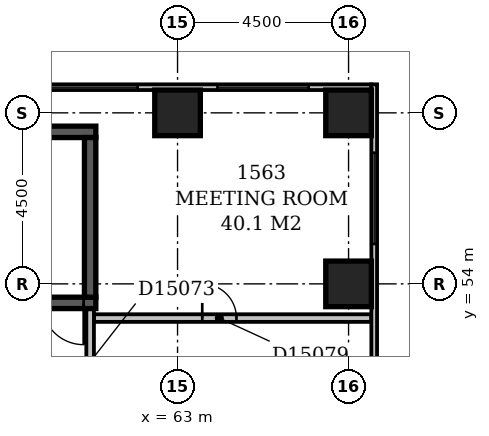
"""IFC4 building model, lengths in metres.
Left out: names, types, materials, properties, quantities, classifications, styles, units other than length and angle.
Written with IfcOpenShell. Run it as: python <this file> out.ifc"""

import sys

from ifc_helpers import new_model, si_unit, direction, frame, frame_2d, origin, origin_2d, place, context, subcontext, project, spatial, rectangle, extrude, element, fill, save


model = new_model("IFC4")
c1 = context("Model", 3, precision=1e-05, world=origin(), true_north=direction((0.0, 1.0)))
c2 = subcontext(c1, "Body", "Model", "MODEL_VIEW")
j1 = project(units=[si_unit("LENGTHUNIT", "METRE"), si_unit("PLANEANGLEUNIT", "RADIAN")], contexts=[c1])
p1 = place(None, origin())
s1 = spatial("IfcSite", under=j1, at=p1, CompositionType="ELEMENT")
p2 = place(p1, origin())
s2 = spatial("IfcBuilding", under=s1, at=p2, CompositionType="ELEMENT")
p3 = place(p2, frame((0.0, 0.0, 65.0)))
s3 = spatial("IfcBuildingStorey", under=s2, at=p3, CompositionType="ELEMENT", Elevation=65.0)
p4 = place(p3, frame((53.85, 53.5, -0.3), z_axis=(0.0, 0.0, 1.0), x_axis=(1.0, 0.0, 0.0)))
e1 = element("IfcWall", 1, at=p4, inside=s3, PredefinedType="SHEAR", context=c2, shape_type="SweptSolid", body=[
    extrude(rectangle(XDim=7.0, YDim=0.3, at=frame_2d((3.5, 0.0))), origin(), (0.0, 0.0, 1.0), 3.6),
])
p5 = place(p4, frame((5.58, 0.0, 0.3)))
e2 = element("IfcOpeningElement", 2, at=p5, cuts=e1, PredefinedType="OPENING", context=c2, shape_type="SweptSolid", body=[
    extrude(rectangle(XDim=1.1, YDim=2.1, at=frame_2d((0.55, 1.05))), frame((0.0, 0.162, 0.0), z_axis=(0.0, -1.0, 0.0), x_axis=(1.0, 0.0, 0.0)), (0.0, 0.0, 1.0), 0.324),
])
p6 = place(p3, frame((53.85, 58.0, -0.3), z_axis=(0.0, 0.0, 1.0), x_axis=(1.0, 0.0, 0.0)))
e3 = element("IfcWall", 3, at=p6, inside=s3, PredefinedType="SHEAR", context=c2, shape_type="SweptSolid", body=[
    extrude(rectangle(XDim=7.0, YDim=0.3, at=frame_2d((3.5, 0.0))), origin(), (0.0, 0.0, 1.0), 3.6),
])
p7 = place(p3, frame((60.7, 53.65, -0.3), z_axis=(0.0, 0.0, 1.0), x_axis=(0.0, 1.0, 0.0)))
e4 = element("IfcWall", 4, at=p7, inside=s3, PredefinedType="SHEAR", context=c2, shape_type="SweptSolid", body=[
    extrude(rectangle(XDim=4.2, YDim=0.3, at=frame_2d((2.1, 0.0))), origin(), (0.0, 0.0, 1.0), 3.6),
])
for number, where, z_axis, x_axis in (
    (5, (67.5, 54.0, -0.3), (0.0, 0.0, 1.0), (1.0, 0.0, 0.0)),
    (6, (63.0, 58.5, -0.3), (0.0, 0.0, 1.0), (1.0, 0.0, 0.0)),
    (7, (67.5, 58.5, -0.3), (0.0, 0.0, 1.0), (1.0, 0.0, 0.0)),
):
    element("IfcColumn", number, at=place(p3, frame(where, z_axis=z_axis, x_axis=x_axis)), inside=s3, PredefinedType="COLUMN", context=c2, shape_type="SweptSolid", body=[
        extrude(rectangle(XDim=1.2, YDim=1.2, at=origin_2d()), origin(), (0.0, 0.0, 1.0), 3.6),
    ])
p8 = place(p3, frame((68.175, 35.4, 0.0), z_axis=(0.0, 0.0, 1.0), x_axis=(0.0, 1.0, 0.0)))
e8 = element("IfcWall", 8, at=p8, inside=s3, PredefinedType="STANDARD", context=c2, shape_type="SweptSolid", body=[
    extrude(rectangle(XDim=23.85, YDim=0.15, at=frame_2d((11.925, 0.0))), origin(), (0.0, 0.0, 1.0), 2.7),
])
p9 = place(p8, frame((1.65, 0.0, 0.6)))
e9 = element("IfcOpeningElement", 9, at=p9, cuts=e8, PredefinedType="OPENING", context=c2, shape_type="SweptSolid", body=[
    extrude(rectangle(XDim=2.4, YDim=1.8, at=frame_2d((1.2, 0.9))), frame((0.0, 0.087, 0.0), z_axis=(0.0, -1.0, 0.0), x_axis=(1.0, 0.0, 0.0)), (0.0, 0.0, 1.0), 0.174),
])
p10 = place(p8, frame((11.977, 0.0, 0.6)))
e10 = element("IfcOpeningElement", 10, at=p10, cuts=e8, PredefinedType="OPENING", context=c2, shape_type="SweptSolid", body=[
    extrude(rectangle(XDim=1.2, YDim=1.8, at=frame_2d((0.6, 0.9))), frame((0.0, 0.087, 0.0), z_axis=(0.0, -1.0, 0.0), x_axis=(1.0, 0.0, 0.0)), (0.0, 0.0, 1.0), 0.174),
])
p11 = place(p8, frame((19.65, 0.0, 0.6)))
e11 = element("IfcOpeningElement", 11, at=p11, cuts=e8, PredefinedType="OPENING", context=c2, shape_type="SweptSolid", body=[
    extrude(rectangle(XDim=2.4, YDim=1.8, at=frame_2d((1.2, 0.9))), frame((0.0, 0.087, 0.0), z_axis=(0.0, -1.0, 0.0), x_axis=(1.0, 0.0, 0.0)), (0.0, 0.0, 1.0), 0.174),
])
p12 = place(p3, frame((68.1, 59.175, 0.0), z_axis=(0.0, 0.0, 1.0), x_axis=(-1.0, 0.0, 0.0)))
e12 = element("IfcWall", 12, at=p12, inside=s3, PredefinedType="STANDARD", context=c2, shape_type="SweptSolid", body=[
    extrude(rectangle(XDim=68.85, YDim=0.15, at=frame_2d((34.425, 0.0))), origin(), (0.0, 0.0, 1.0), 2.7),
])
p13 = place(p12, frame((1.65, 0.0, 0.6)))
e13 = element("IfcOpeningElement", 13, at=p13, cuts=e12, PredefinedType="OPENING", context=c2, shape_type="SweptSolid", body=[
    extrude(rectangle(XDim=2.4, YDim=1.8, at=frame_2d((1.2, 0.9))), frame((0.0, 0.087, 0.0), z_axis=(0.0, -1.0, 0.0), x_axis=(1.0, 0.0, 0.0)), (0.0, 0.0, 1.0), 0.174),
])
p14 = place(p12, frame((6.15, 0.0, 0.6)))
e14 = element("IfcOpeningElement", 14, at=p14, cuts=e12, PredefinedType="OPENING", context=c2, shape_type="SweptSolid", body=[
    extrude(rectangle(XDim=2.4, YDim=1.8, at=frame_2d((1.2, 0.9))), frame((0.0, 0.087, 0.0), z_axis=(0.0, -1.0, 0.0), x_axis=(1.0, 0.0, 0.0)), (0.0, 0.0, 1.0), 0.174),
])
p15 = place(p12, frame((39.002, 0.0, 0.6)))
e15 = element("IfcOpeningElement", 15, at=p15, cuts=e12, PredefinedType="OPENING", context=c2, shape_type="SweptSolid", body=[
    extrude(rectangle(XDim=0.9, YDim=1.8, at=frame_2d((0.45, 0.9))), frame((0.0, 0.087, 0.0), z_axis=(0.0, -1.0, 0.0), x_axis=(1.0, 0.0, 0.0)), (0.0, 0.0, 1.0), 0.174),
])
p16 = place(p3, frame((60.7, 51.6, 0.0), z_axis=(0.0, 0.0, 1.0), x_axis=(0.0, 1.0, 0.0)))
e16 = element("IfcWall", 16, at=p16, inside=s3, PredefinedType="PARTITIONING", context=c2, shape_type="SweptSolid", body=[
    extrude(rectangle(XDim=1.73, YDim=0.2, at=frame_2d((0.865, 0.0))), origin(), (0.0, 0.0, 1.0), 3.3),
])
p17 = place(p3, frame((60.8, 53.1, 0.0), z_axis=(0.0, 0.0, 1.0), x_axis=(1.0, 0.0, 0.0)))
e17 = element("IfcWall", 17, at=p17, inside=s3, PredefinedType="PARTITIONING", context=c2, shape_type="SweptSolid", body=[
    extrude(rectangle(XDim=7.3, YDim=0.2, at=frame_2d((3.65, 0.0))), origin(), (0.0, 0.0, 1.0), 3.3),
])
p18 = place(p17, frame((2.85, 0.0, 0.0)))
e18 = element("IfcOpeningElement", 18, at=p18, cuts=e17, PredefinedType="OPENING", context=c2, shape_type="SweptSolid", body=[
    extrude(rectangle(XDim=0.9, YDim=2.1, at=frame_2d((0.45, 1.05))), frame((0.0, 0.112, 0.0), z_axis=(0.0, -1.0, 0.0), x_axis=(1.0, 0.0, 0.0)), (0.0, 0.0, 1.0), 0.224),
])
p19 = place(p11, origin())
e19 = element("IfcWindow", 19, at=p19, inside=s3, PartitioningType="SINGLE_PANEL", PredefinedType="WINDOW", context=c2, shape_type="SweptSolid", body=[
    extrude(rectangle(XDim=2.4, YDim=1.8, at=frame_2d((1.2, 0.9))), frame((0.0, 0.03, 0.0), z_axis=(0.0, -1.0, 0.0), x_axis=(1.0, 0.0, 0.0)), (0.0, 0.0, 1.0), 0.06),
])
fill(e11, e19)
p20 = place(p13, origin())
e20 = element("IfcWindow", 20, at=p20, inside=s3, PartitioningType="SINGLE_PANEL", PredefinedType="WINDOW", context=c2, shape_type="SweptSolid", body=[
    extrude(rectangle(XDim=2.4, YDim=1.8, at=frame_2d((1.2, 0.9))), frame((0.0, 0.03, 0.0), z_axis=(0.0, -1.0, 0.0), x_axis=(1.0, 0.0, 0.0)), (0.0, 0.0, 1.0), 0.06),
])
fill(e13, e20)
p21 = place(p14, origin())
e21 = element("IfcWindow", 21, at=p21, inside=s3, PartitioningType="SINGLE_PANEL", PredefinedType="WINDOW", context=c2, shape_type="SweptSolid", body=[
    extrude(rectangle(XDim=2.4, YDim=1.8, at=frame_2d((1.2, 0.9))), frame((0.0, 0.03, 0.0), z_axis=(0.0, -1.0, 0.0), x_axis=(1.0, 0.0, 0.0)), (0.0, 0.0, 1.0), 0.06),
])
fill(e14, e21)
p22 = place(p5, origin())
e22 = element("IfcDoor", 22, at=p22, inside=s3, OperationType="SINGLE_SWING_RIGHT", PredefinedType="DOOR", context=c2, shape_type="SweptSolid", body=[
    extrude(rectangle(XDim=1.1, YDim=2.1, at=frame_2d((0.55, 1.05))), frame((0.0, 0.025, 0.0), z_axis=(0.0, -1.0, 0.0), x_axis=(1.0, 0.0, 0.0)), (0.0, 0.0, 1.0), 0.05),
])
fill(e2, e22)
p23 = place(p18, origin())
e23 = element("IfcDoor", 23, at=p23, inside=s3, OperationType="SINGLE_SWING_LEFT", PredefinedType="DOOR", context=c2, shape_type="SweptSolid", body=[
    extrude(rectangle(XDim=0.9, YDim=2.1, at=frame_2d((0.45, 1.05))), frame((0.0, 0.025, 0.0), z_axis=(0.0, -1.0, 0.0), x_axis=(1.0, 0.0, 0.0)), (0.0, 0.0, 1.0), 0.05),
])
fill(e18, e23)
save(model, sys.argv[1])
